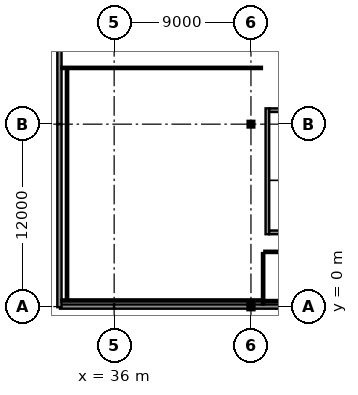
"""IFC4 building model, lengths in metres.
Left out: names, types, materials, properties, quantities, classifications, styles, units other than length and angle.
Written with IfcOpenShell. Run it as: python <this file> out.ifc"""

import sys

from ifc_helpers import new_model, si_unit, direction, frame, frame_2d, origin, origin_2d, place, context, subcontext, project, spatial, rectangle, i_section, extrude, element, fill, save


model = new_model("IFC4")
c1 = context("Model", 3, precision=1e-05, world=origin(), true_north=direction((0.0, 1.0)))
c2 = subcontext(c1, "Body", "Model", "MODEL_VIEW")
j1 = project(units=[si_unit("LENGTHUNIT", "METRE"), si_unit("PLANEANGLEUNIT", "RADIAN")], contexts=[c1])
p1 = place(None, origin())
s1 = spatial("IfcSite", under=j1, at=p1, CompositionType="ELEMENT")
p2 = place(p1, origin())
s2 = spatial("IfcBuilding", under=s1, at=p2, CompositionType="ELEMENT")
p3 = place(p2, frame((0.0, 0.0, 27.4)))
s3 = spatial("IfcBuildingStorey", under=s2, at=p3, CompositionType="ELEMENT", Elevation=27.4)
p4 = place(p3, frame((45.0, 0.0, 0.0), z_axis=(0.0, 0.0, 1.0), x_axis=(0.0, 1.0, 0.0)))
e1 = element("IfcColumn", 1, at=p4, inside=s3, PredefinedType="COLUMN", context=c2, shape_type="SweptSolid", body=[
    extrude(i_section(OverallWidth=0.3, OverallDepth=0.32, WebThickness=0.011, FlangeThickness=0.021, at=origin_2d()), origin(), (0.0, 0.0, 1.0), 4.0),
])
p5 = place(p3, frame((45.0, 12.0, 0.0), z_axis=(0.0, 0.0, 1.0), x_axis=(1.0, 0.0, 0.0)))
e2 = element("IfcColumn", 2, at=p5, inside=s3, PredefinedType="COLUMN", context=c2, shape_type="SweptSolid", body=[
    extrude(i_section(OverallWidth=0.28, OverallDepth=0.28, WebThickness=0.01, FlangeThickness=0.018, at=origin_2d()), origin(), (0.0, 0.0, 1.0), 4.0),
])
p6 = place(p3, frame((32.44, 0.0, 0.0), z_axis=(0.0, 0.0, 1.0), x_axis=(1.0, 0.0, 0.0)))
e3 = element("IfcWall", 3, at=p6, inside=s3, PredefinedType="SOLIDWALL", context=c2, shape_type="SweptSolid", body=[
    extrude(rectangle(XDim=3.57, YDim=0.28, at=frame_2d((1.785, 0.0))), origin(), (0.0, 0.0, 1.0), 2.787),
])
p7 = place(p3, frame((35.99, 0.0, 0.0), z_axis=(0.0, 0.0, 1.0), x_axis=(1.0, 0.0, 0.0)))
e4 = element("IfcWall", 4, at=p7, inside=s3, PredefinedType="SOLIDWALL", context=c2, shape_type="SweptSolid", body=[
    extrude(rectangle(XDim=8.852, YDim=0.28, at=frame_2d((4.426, 0.0))), origin(), (0.0, 0.0, 1.0), 2.787),
])
p8 = place(p3, frame((45.158, 0.0, 0.0), z_axis=(0.0, 0.0, 1.0), x_axis=(1.0, 0.0, 0.0)))
e5 = element("IfcWall", 5, at=p8, inside=s3, PredefinedType="SOLIDWALL", context=c2, shape_type="SweptSolid", body=[
    extrude(rectangle(XDim=8.834, YDim=0.28, at=frame_2d((4.417, 0.0))), origin(), (0.0, 0.0, 1.0), 2.787),
])
p9 = place(p8, frame((2.0, 0.0, 1.05)))
e6 = element("IfcOpeningElement", 6, at=p9, cuts=e5, PredefinedType="OPENING", context=c2, shape_type="SweptSolid", body=[
    extrude(rectangle(XDim=1.3, YDim=1.3, at=frame_2d((0.65, 0.65))), frame((0.0, 0.155, 0.0), z_axis=(0.0, -1.0, 0.0), x_axis=(1.0, 0.0, 0.0)), (0.0, 0.0, 1.0), 0.31),
])
p10 = place(p8, frame((5.534, 0.0, 1.05)))
e7 = element("IfcOpeningElement", 7, at=p10, cuts=e5, PredefinedType="OPENING", context=c2, shape_type="SweptSolid", body=[
    extrude(rectangle(XDim=1.3, YDim=1.3, at=frame_2d((0.65, 0.65))), frame((0.0, 0.155, 0.0), z_axis=(0.0, -1.0, 0.0), x_axis=(1.0, 0.0, 0.0)), (0.0, 0.0, 1.0), 0.31),
])
p11 = place(p3, frame((32.4, 23.96, 0.0), z_axis=(0.0, 0.0, 1.0), x_axis=(0.0, -1.0, 0.0)))
e8 = element("IfcWall", 8, at=p11, inside=s3, PredefinedType="SOLIDWALL", context=c2, shape_type="SweptSolid", body=[
    extrude(rectangle(XDim=11.97, YDim=0.28, at=frame_2d((5.985, 0.0))), origin(), (0.0, 0.0, 1.0), 3.095),
])
p12 = place(p11, frame((2.941, 0.0, 1.05)))
e9 = element("IfcOpeningElement", 9, at=p12, cuts=e8, PredefinedType="OPENING", context=c2, shape_type="SweptSolid", body=[
    extrude(rectangle(XDim=1.3, YDim=1.3, at=frame_2d((0.65, 0.65))), frame((0.0, 0.155, 0.0), z_axis=(0.0, -1.0, 0.0), x_axis=(1.0, 0.0, 0.0)), (0.0, 0.0, 1.0), 0.31),
])
p13 = place(p11, frame((8.5, 0.0, 1.05)))
e10 = element("IfcOpeningElement", 10, at=p13, cuts=e8, PredefinedType="OPENING", context=c2, shape_type="SweptSolid", body=[
    extrude(rectangle(XDim=1.3, YDim=1.3, at=frame_2d((0.65, 0.65))), frame((0.0, 0.155, 0.0), z_axis=(0.0, -1.0, 0.0), x_axis=(1.0, 0.0, 0.0)), (0.0, 0.0, 1.0), 0.31),
])
p14 = place(p3, frame((32.4, 12.01, 0.0), z_axis=(0.0, 0.0, 1.0), x_axis=(0.0, -1.0, 0.0)))
e11 = element("IfcWall", 11, at=p14, inside=s3, PredefinedType="SOLIDWALL", context=c2, shape_type="SweptSolid", body=[
    extrude(rectangle(XDim=12.05, YDim=0.28, at=frame_2d((6.025, 0.0))), origin(), (0.0, 0.0, 1.0), 3.095),
])
p15 = place(p14, frame((2.965, 0.0, 1.05)))
e12 = element("IfcOpeningElement", 12, at=p15, cuts=e11, PredefinedType="OPENING", context=c2, shape_type="SweptSolid", body=[
    extrude(rectangle(XDim=1.3, YDim=1.3, at=frame_2d((0.65, 0.65))), frame((0.0, 0.155, 0.0), z_axis=(0.0, -1.0, 0.0), x_axis=(1.0, 0.0, 0.0)), (0.0, 0.0, 1.0), 0.31),
])
p16 = place(p14, frame((7.785, 0.0, 1.05)))
e13 = element("IfcOpeningElement", 13, at=p16, cuts=e11, PredefinedType="OPENING", context=c2, shape_type="SweptSolid", body=[
    extrude(rectangle(XDim=1.3, YDim=1.3, at=frame_2d((0.65, 0.65))), frame((0.0, 0.155, 0.0), z_axis=(0.0, -1.0, 0.0), x_axis=(1.0, 0.0, 0.0)), (0.0, 0.0, 1.0), 0.31),
])
p17 = place(p3, frame((46.08, 4.76, 0.0), z_axis=(0.0, 0.0, 1.0), x_axis=(0.0, 1.0, 0.0)))
e14 = element("IfcWall", 14, at=p17, inside=s3, PredefinedType="SHEAR", context=c2, shape_type="SweptSolid", body=[
    extrude(rectangle(XDim=8.28, YDim=0.24, at=frame_2d((4.14, 0.0))), origin(), (0.0, 0.0, 1.0), 3.81),
])
for number, where, z_axis, x_axis in (
    (15, (46.2, 4.88, 0.0), (0.0, 0.0, 1.0), (1.0, 0.0, 0.0)),
    (16, (46.2, 12.92, 0.0), (0.0, 0.0, 1.0), (1.0, 0.0, 0.0)),
):
    element("IfcWall", number, at=place(p3, frame(where, z_axis=z_axis, x_axis=x_axis)), inside=s3, PredefinedType="SHEAR", context=c2, shape_type="SweptSolid", body=[
        extrude(rectangle(XDim=3.7, YDim=0.24, at=frame_2d((1.85, 0.0))), origin(), (0.0, 0.0, 1.0), 3.81),
    ])
p18 = place(p3, frame((71.92, 0.36, 0.0), z_axis=(0.0, 0.0, 1.0), x_axis=(-1.0, 0.0, 0.0)))
e17 = element("IfcWall", 17, at=p18, inside=s3, PredefinedType="PARTITIONING", context=c2, shape_type="SweptSolid", body=[
    extrude(rectangle(XDim=26.04, YDim=0.15, at=frame_2d((13.02, 0.0))), origin(), (0.0, 0.0, 1.0), 3.64),
])
p19 = place(p3, frame((45.8, 0.135, 0.0), z_axis=(0.0, 0.0, 1.0), x_axis=(0.0, 1.0, 0.0)))
e18 = element("IfcWall", 18, at=p19, inside=s3, PredefinedType="PARTITIONING", context=c2, shape_type="SweptSolid", body=[
    extrude(rectangle(XDim=3.385, YDim=0.15, at=frame_2d((1.692, 0.0))), origin(), (0.0, 0.0, 1.0), 3.64),
])
p20 = place(p3, frame((45.88, 3.6, 0.0), z_axis=(0.0, 0.0, 1.0), x_axis=(1.0, 0.0, 0.0)))
e19 = element("IfcWall", 19, at=p20, inside=s3, PredefinedType="PARTITIONING", context=c2, shape_type="SweptSolid", body=[
    extrude(rectangle(XDim=58.24, YDim=0.15, at=frame_2d((29.12, 0.0))), origin(), (0.0, 0.0, 1.0), 3.64),
])
p21 = place(p20, frame((27.795, 0.0, 0.0)))
e20 = element("IfcOpeningElement", 20, at=p21, cuts=e19, PredefinedType="OPENING", context=c2, shape_type="SweptSolid", body=[
    extrude(rectangle(XDim=1.05, YDim=2.25, at=frame_2d((0.525, 1.125))), frame((0.0, 0.09, 0.0), z_axis=(0.0, -1.0, 0.0), x_axis=(1.0, 0.0, 0.0)), (0.0, 0.0, 1.0), 0.18),
])
p22 = place(p3, frame((45.73, 0.4, 0.0), z_axis=(0.0, 0.0, 1.0), x_axis=(-1.0, 0.0, 0.0)))
e21 = element("IfcWall", 21, at=p22, inside=s3, PredefinedType="PARTITIONING", context=c2, shape_type="SweptSolid", body=[
    extrude(rectangle(XDim=13.195, YDim=0.15, at=frame_2d((6.598, 0.0))), origin(), (0.0, 0.0, 1.0), 3.64),
])
p23 = place(p3, frame((32.9, 0.47, 0.0), z_axis=(0.0, 0.0, 1.0), x_axis=(0.0, 1.0, 0.0)))
e22 = element("IfcWall", 22, at=p23, inside=s3, PredefinedType="PARTITIONING", context=c2, shape_type="SweptSolid", body=[
    extrude(rectangle(XDim=15.15, YDim=0.15, at=frame_2d((7.575, 0.0))), origin(), (0.0, 0.0, 1.0), 3.64),
])
p24 = place(p3, frame((32.535, 15.7, 0.0), z_axis=(0.0, 0.0, 1.0), x_axis=(1.0, 0.0, 0.0)))
e23 = element("IfcWall", 23, at=p24, inside=s3, PredefinedType="PARTITIONING", context=c2, shape_type="SweptSolid", body=[
    extrude(rectangle(XDim=13.185, YDim=0.15, at=frame_2d((6.593, 0.0))), origin(), (0.0, 0.0, 1.0), 3.64),
])
p25 = place(p24, frame((6.068, 0.0, 0.0)))
e24 = element("IfcOpeningElement", 24, at=p25, cuts=e23, PredefinedType="OPENING", context=c2, shape_type="SweptSolid", body=[
    extrude(rectangle(XDim=1.05, YDim=2.25, at=frame_2d((0.525, 1.125))), frame((0.0, 0.09, 0.0), z_axis=(0.0, -1.0, 0.0), x_axis=(1.0, 0.0, 0.0)), (0.0, 0.0, 1.0), 0.18),
])
p26 = place(p13, origin())
e25 = element("IfcWindow", 25, at=p26, inside=s3, PartitioningType="SINGLE_PANEL", PredefinedType="WINDOW", context=c2, shape_type="SweptSolid", body=[
    extrude(rectangle(XDim=1.3, YDim=1.3, at=frame_2d((0.65, 0.65))), frame((0.0, 0.03, 0.0), z_axis=(0.0, -1.0, 0.0), x_axis=(1.0, 0.0, 0.0)), (0.0, 0.0, 1.0), 0.06),
])
fill(e10, e25)
p27 = place(p15, origin())
e26 = element("IfcWindow", 26, at=p27, inside=s3, PartitioningType="SINGLE_PANEL", PredefinedType="WINDOW", context=c2, shape_type="SweptSolid", body=[
    extrude(rectangle(XDim=1.3, YDim=1.3, at=frame_2d((0.65, 0.65))), frame((0.0, 0.03, 0.0), z_axis=(0.0, -1.0, 0.0), x_axis=(1.0, 0.0, 0.0)), (0.0, 0.0, 1.0), 0.06),
])
fill(e12, e26)
p28 = place(p16, origin())
e27 = element("IfcWindow", 27, at=p28, inside=s3, PartitioningType="SINGLE_PANEL", PredefinedType="WINDOW", context=c2, shape_type="SweptSolid", body=[
    extrude(rectangle(XDim=1.3, YDim=1.3, at=frame_2d((0.65, 0.65))), frame((0.0, 0.03, 0.0), z_axis=(0.0, -1.0, 0.0), x_axis=(1.0, 0.0, 0.0)), (0.0, 0.0, 1.0), 0.06),
])
fill(e13, e27)
p29 = place(p25, origin())
e28 = element("IfcDoor", 28, at=p29, inside=s3, OperationType="SINGLE_SWING_RIGHT", PredefinedType="DOOR", context=c2, shape_type="SweptSolid", body=[
    extrude(rectangle(XDim=1.05, YDim=2.25, at=frame_2d((0.525, 1.125))), frame((0.0, 0.025, 0.0), z_axis=(0.0, -1.0, 0.0), x_axis=(1.0, 0.0, 0.0)), (0.0, 0.0, 1.0), 0.05),
])
fill(e24, e28)
save(model, sys.argv[1])
